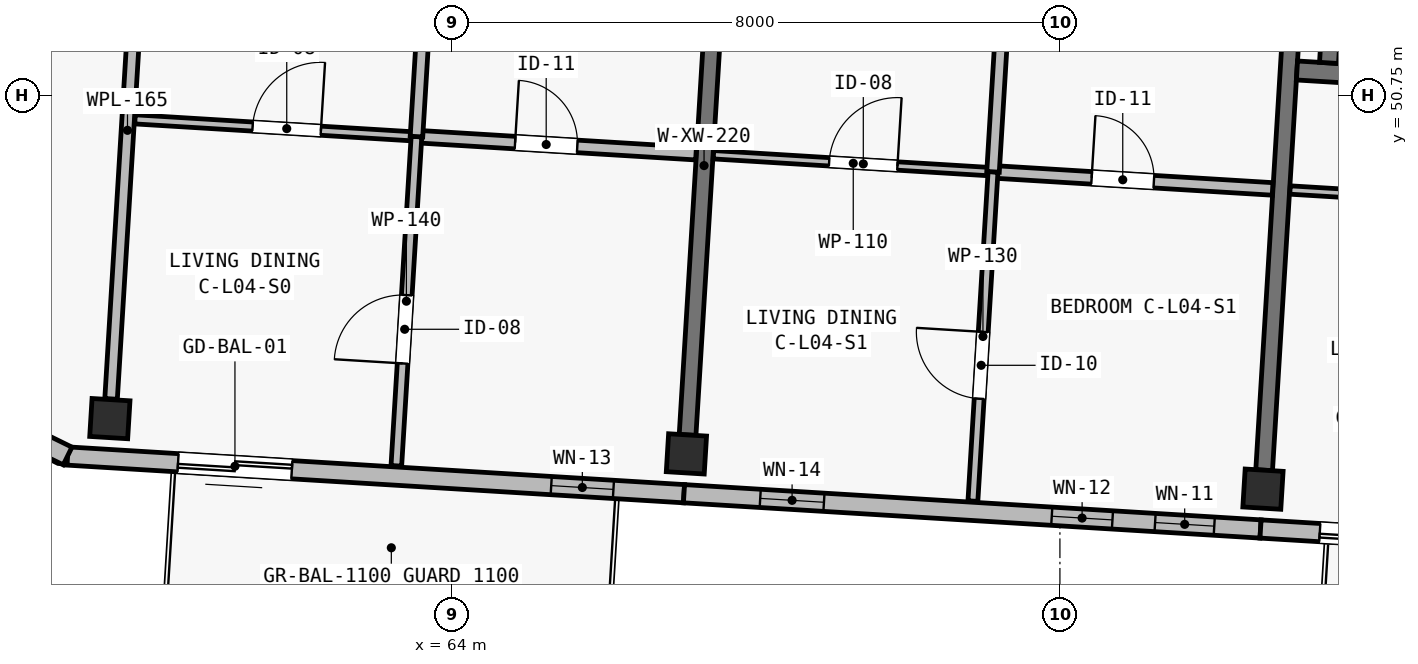
"""IFC4 building model, lengths in metres.
Left out: names, types, materials, properties, quantities, classifications, styles, units other than length and angle.
Written with IfcOpenShell. Run it as: python <this file> out.ifc"""

import sys

from ifc_helpers import new_model, si_unit, direction, frame, frame_2d, origin, origin_2d, place, context, subcontext, project, spatial, rectangle, extrude, element, fill, save


model = new_model("IFC4")
c1 = context("Model", 3, precision=1e-05, world=origin(), true_north=direction((0.0, 1.0)))
c2 = subcontext(c1, "Body", "Model", "MODEL_VIEW")
j1 = project(units=[si_unit("LENGTHUNIT", "METRE"), si_unit("PLANEANGLEUNIT", "RADIAN")], contexts=[c1])
p1 = place(None, origin())
s1 = spatial("IfcSite", under=j1, at=p1, CompositionType="ELEMENT")
p2 = place(p1, origin())
s2 = spatial("IfcBuilding", under=s1, at=p2, CompositionType="ELEMENT")
p3 = place(p2, frame((0.0, 0.0, 14.9)))
s3 = spatial("IfcBuildingStorey", under=s2, at=p3, CompositionType="ELEMENT", Elevation=14.9)
for number, where, z_axis, x_axis in (
    (1, (59.5, 46.5, 0.0), (0.0, 0.0, 1.0), (0.998, -0.061, 0.0)),
    (2, (67.086, 46.036, 0.0), (0.0, 0.0, 1.0), (0.998, -0.061, 0.0)),
    (3, (74.672, 45.572, 0.0), (0.0, 0.0, 1.0), (0.998, -0.061, 0.0)),
):
    element("IfcColumn", number, at=place(p3, frame(where, z_axis=z_axis, x_axis=x_axis)), inside=s3, PredefinedType="COLUMN", context=c2, shape_type="SweptSolid", body=[
        extrude(rectangle(XDim=0.5, YDim=0.5, at=origin_2d()), origin(), (0.0, 0.0, 1.0), 3.25),
    ])
p4 = place(p3, frame((67.101, 46.286, 0.0), z_axis=(0.0, 0.0, 1.0), x_axis=(0.061035953884, 0.998135568114, 0.0)))
e4 = element("IfcWall", 4, at=p4, inside=s3, PredefinedType="SHEAR", context=c2, shape_type="SweptSolid", body=[
    extrude(rectangle(XDim=7.1, YDim=0.22, at=frame_2d((3.55, 0.0))), origin(), (0.0, 0.0, 1.0), 2.5),
])
p5 = place(p3, frame((74.687, 45.822, 0.0), z_axis=(0.0, 0.0, 1.0), x_axis=(0.061033859059, 0.99813569621, 0.0)))
e5 = element("IfcWall", 5, at=p5, inside=s3, PredefinedType="SHEAR", context=c2, shape_type="SweptSolid", body=[
    extrude(rectangle(XDim=7.1, YDim=0.22, at=frame_2d((3.55, 0.0))), origin(), (0.0, 0.0, 1.0), 2.5),
])
p6 = place(p3, frame((75.119, 51.08, 0.0), z_axis=(0.0, 0.0, 1.0), x_axis=(0.998133370443, -0.061071882298, 0.0)))
e6 = element("IfcWall", 6, at=p6, inside=s3, PredefinedType="SHEAR", context=c2, shape_type="SweptSolid", body=[
    extrude(rectangle(XDim=2.99, YDim=0.25, at=frame_2d((1.495, 0.0))), origin(), (0.0, 0.0, 1.0), 3.25),
])
p7 = place(p3, frame((75.541, 51.179, 0.0), z_axis=(0.0, 0.0, 1.0), x_axis=(0.061037062968, 0.998135500293, 0.0)))
e7 = element("IfcWall", 7, at=p7, inside=s3, PredefinedType="SHEAR", context=c2, shape_type="SweptSolid", body=[
    extrude(rectangle(XDim=1.7, YDim=0.25, at=frame_2d((0.85, 0.0))), origin(), (0.0, 0.0, 1.0), 3.25),
])
p8 = place(p3, frame((67.054, 45.512, 0.0), z_axis=(0.0, 0.0, 1.0), x_axis=(-0.998134248939, 0.061057522844, 0.0)))
e8 = element("IfcWall", 8, at=p8, inside=s3, PredefinedType="SOLIDWALL", context=c2, shape_type="SweptSolid", body=[
    extrude(rectangle(XDim=8.125, YDim=0.24, at=frame_2d((4.062, 0.0))), origin(), (0.0, 0.0, 1.0), 3.0),
])
p9 = place(p8, frame((5.169, 0.0, 0.0)))
e9 = element("IfcOpeningElement", 9, at=p9, cuts=e8, PredefinedType="OPENING", context=c2, shape_type="SweptSolid", body=[
    extrude(rectangle(XDim=1.5, YDim=2.12, at=frame_2d((0.75, 1.06))), frame((0.0, 0.135, 0.0), z_axis=(0.0, -1.0, 0.0), x_axis=(1.0, 0.0, 0.0)), (0.0, 0.0, 1.0), 0.27),
])
p10 = place(p8, frame((0.93, 0.0, 0.46)))
e10 = element("IfcOpeningElement", 10, at=p10, cuts=e8, PredefinedType="OPENING", context=c2, shape_type="SweptSolid", body=[
    extrude(rectangle(XDim=0.82, YDim=2.18, at=frame_2d((0.41, 1.09))), frame((0.0, 0.135, 0.0), z_axis=(0.0, -1.0, 0.0), x_axis=(1.0, 0.0, 0.0)), (0.0, 0.0, 1.0), 0.27),
])
p11 = place(p3, frame((74.64, 45.048, 0.0), z_axis=(0.0, 0.0, 1.0), x_axis=(-0.998135669243, 0.061034300063, 0.0)))
e11 = element("IfcWall", 11, at=p11, inside=s3, PredefinedType="SOLIDWALL", context=c2, shape_type="SweptSolid", body=[
    extrude(rectangle(XDim=7.6, YDim=0.24, at=frame_2d((3.8, 0.0))), origin(), (0.0, 0.0, 1.0), 3.0),
])
p12 = place(p11, frame((0.61, 0.0, 0.52)))
e12 = element("IfcOpeningElement", 12, at=p12, cuts=e11, PredefinedType="OPENING", context=c2, shape_type="SweptSolid", body=[
    extrude(rectangle(XDim=0.78, YDim=2.2, at=frame_2d((0.39, 1.1))), frame((0.0, 0.135, 0.0), z_axis=(0.0, -1.0, 0.0), x_axis=(1.0, 0.0, 0.0)), (0.0, 0.0, 1.0), 0.27),
])
p13 = place(p11, frame((1.952, 0.0, 0.42)))
e13 = element("IfcOpeningElement", 13, at=p13, cuts=e11, PredefinedType="OPENING", context=c2, shape_type="SweptSolid", body=[
    extrude(rectangle(XDim=0.8, YDim=2.3, at=frame_2d((0.4, 1.15))), frame((0.0, 0.135, 0.0), z_axis=(0.0, -1.0, 0.0), x_axis=(1.0, 0.0, 0.0)), (0.0, 0.0, 1.0), 0.27),
])
p14 = place(p11, frame((5.755, 0.0, 0.52)))
e14 = element("IfcOpeningElement", 14, at=p14, cuts=e11, PredefinedType="OPENING", context=c2, shape_type="SweptSolid", body=[
    extrude(rectangle(XDim=0.84, YDim=2.28, at=frame_2d((0.42, 1.14))), frame((0.0, 0.135, 0.0), z_axis=(0.0, -1.0, 0.0), x_axis=(1.0, 0.0, 0.0)), (0.0, 0.0, 1.0), 0.27),
])
p15 = place(p3, frame((82.225, 44.584, 0.0), z_axis=(0.0, 0.0, 1.0), x_axis=(-0.998133591969, 0.061068261669, 0.0)))
e15 = element("IfcWall", 15, at=p15, inside=s3, PredefinedType="SOLIDWALL", context=c2, shape_type="SweptSolid", body=[
    extrude(rectangle(XDim=7.6, YDim=0.24, at=frame_2d((3.8, 0.0))), origin(), (0.0, 0.0, 1.0), 3.0),
])
p16 = place(p15, frame((5.019, 0.0, 0.0)))
e16 = element("IfcOpeningElement", 16, at=p16, cuts=e15, PredefinedType="OPENING", context=c2, shape_type="SweptSolid", body=[
    extrude(rectangle(XDim=1.8, YDim=2.12, at=frame_2d((0.9, 1.06))), frame((0.0, 0.135, 0.0), z_axis=(0.0, -1.0, 0.0), x_axis=(1.0, 0.0, 0.0)), (0.0, 0.0, 1.0), 0.27),
])
p17 = place(p15, frame((0.63, 0.0, 0.42)))
e17 = element("IfcOpeningElement", 17, at=p17, cuts=e15, PredefinedType="OPENING", context=c2, shape_type="SweptSolid", body=[
    extrude(rectangle(XDim=0.64, YDim=2.18, at=frame_2d((0.32, 1.09))), frame((0.0, 0.135, 0.0), z_axis=(0.0, -1.0, 0.0), x_axis=(1.0, 0.0, 0.0)), (0.0, 0.0, 1.0), 0.27),
])
p18 = place(p3, frame((58.944, 46.008, 0.0), z_axis=(0.0, 0.0, 1.0), x_axis=(-0.897775054318, 0.440454256246, 0.0)))
e18 = element("IfcWall", 18, at=p18, inside=s3, PredefinedType="SOLIDWALL", context=c2, shape_type="SweptSolid", body=[
    extrude(rectangle(XDim=8.12, YDim=0.26, at=frame_2d((4.06, 0.0))), origin(), (0.0, 0.0, 1.0), 3.0),
])
p19 = place(p18, frame((2.45, 0.0, 0.45)))
e19 = element("IfcOpeningElement", 19, at=p19, cuts=e18, PredefinedType="OPENING", context=c2, shape_type="SweptSolid", body=[
    extrude(rectangle(XDim=0.76, YDim=2.34, at=frame_2d((0.38, 1.17))), frame((0.0, 0.145, 0.0), z_axis=(0.0, -1.0, 0.0), x_axis=(1.0, 0.0, 0.0)), (0.0, 0.0, 1.0), 0.29),
])
p20 = place(p18, frame((5.07, 0.0, 0.52)))
e20 = element("IfcOpeningElement", 20, at=p20, cuts=e18, PredefinedType="OPENING", context=c2, shape_type="SweptSolid", body=[
    extrude(rectangle(XDim=0.6, YDim=2.22, at=frame_2d((0.3, 1.11))), frame((0.0, 0.145, 0.0), z_axis=(0.0, -1.0, 0.0), x_axis=(1.0, 0.0, 0.0)), (0.0, 0.0, 1.0), 0.29),
])
p21 = place(p3, frame((51.654, 49.585, 0.0), z_axis=(0.0, 0.0, 1.0), x_axis=(0.448621989068, 0.893721607059, 0.0)))
e21 = element("IfcWall", 21, at=p21, inside=s3, PredefinedType="SOLIDWALL", context=c2, shape_type="SweptSolid", body=[
    extrude(rectangle(XDim=19.061, YDim=0.26, at=frame_2d((9.53, 0.0))), origin(), (0.0, 0.0, 1.0), 3.0),
])
p22 = place(p21, frame((2.45, 0.0, 0.45)))
e22 = element("IfcOpeningElement", 22, at=p22, cuts=e21, PredefinedType="OPENING", context=c2, shape_type="SweptSolid", body=[
    extrude(rectangle(XDim=0.76, YDim=2.34, at=frame_2d((0.38, 1.17))), frame((0.0, 0.145, 0.0), z_axis=(0.0, -1.0, 0.0), x_axis=(1.0, 0.0, 0.0)), (0.0, 0.0, 1.0), 0.29),
])
p23 = place(p21, frame((16.01, 0.0, 0.52)))
e23 = element("IfcOpeningElement", 23, at=p23, cuts=e21, PredefinedType="OPENING", context=c2, shape_type="SweptSolid", body=[
    extrude(rectangle(XDim=0.6, YDim=2.22, at=frame_2d((0.3, 1.11))), frame((0.0, 0.145, 0.0), z_axis=(0.0, -1.0, 0.0), x_axis=(1.0, 0.0, 0.0)), (0.0, 0.0, 1.0), 0.29),
])
p24 = place(p3, frame((59.516, 46.76, 0.0), z_axis=(0.0, 0.0, 1.0), x_axis=(0.061034344288, 0.998135666539, 0.0)))
e24 = element("IfcWall", 24, at=p24, inside=s3, PredefinedType="PLUMBINGWALL", context=c2, shape_type="SweptSolid", body=[
    extrude(rectangle(XDim=7.08, YDim=0.165, at=frame_2d((3.54, 0.0))), origin(), (0.0, 0.0, 1.0), 2.5),
])
p25 = place(p3, frame((59.831, 50.437, 0.0), z_axis=(0.0, 0.0, 1.0), x_axis=(0.998133408508, -0.061071260176, 0.0)))
e25 = element("IfcWall", 25, at=p25, inside=s3, PredefinedType="PARTITIONING", context=c2, shape_type="SweptSolid", body=[
    extrude(rectangle(XDim=3.71, YDim=0.12, at=frame_2d((1.855, 0.0))), origin(), (0.0, 0.0, 1.0), 2.97),
])
p26 = place(p25, frame((1.55, 0.0, 0.0)))
e26 = element("IfcOpeningElement", 26, at=p26, cuts=e25, PredefinedType="OPENING", context=c2, shape_type="SweptSolid", body=[
    extrude(rectangle(XDim=0.9, YDim=2.1, at=frame_2d((0.45, 1.05))), frame((0.0, 0.075, 0.0), z_axis=(0.0, -1.0, 0.0), x_axis=(1.0, 0.0, 0.0)), (0.0, 0.0, 1.0), 0.15),
])
p27 = place(p3, frame((63.534, 50.211, 0.0), z_axis=(0.0, 0.0, 1.0), x_axis=(0.998132682596, -0.061083123148, 0.0)))
e27 = element("IfcWall", 27, at=p27, inside=s3, PredefinedType="PLUMBINGWALL", context=c2, shape_type="SweptSolid", body=[
    extrude(rectangle(XDim=3.685, YDim=0.165, at=frame_2d((1.843, 0.0))), origin(), (0.0, 0.0, 1.0), 2.97),
])
p28 = place(p27, frame((1.3, 0.0, 0.0)))
e28 = element("IfcOpeningElement", 28, at=p28, cuts=e27, PredefinedType="OPENING", context=c2, shape_type="SweptSolid", body=[
    extrude(rectangle(XDim=0.82, YDim=2.08, at=frame_2d((0.41, 1.04))), frame((0.0, 0.097, 0.0), z_axis=(0.0, -1.0, 0.0), x_axis=(1.0, 0.0, 0.0)), (0.0, 0.0, 1.0), 0.195),
])
p29 = place(p3, frame((63.269, 45.879, 0.0), z_axis=(0.0, 0.0, 1.0), x_axis=(0.06103343432, 0.998135722182, 0.0)))
e29 = element("IfcWall", 29, at=p29, inside=s3, PredefinedType="PARTITIONING", context=c2, shape_type="SweptSolid", body=[
    extrude(rectangle(XDim=4.34, YDim=0.14, at=frame_2d((2.17, 0.0))), origin(), (0.0, 0.0, 1.0), 2.97),
])
p30 = place(p29, frame((1.35, 0.0, 0.0)))
e30 = element("IfcOpeningElement", 30, at=p30, cuts=e29, PredefinedType="OPENING", context=c2, shape_type="SweptSolid", body=[
    extrude(rectangle(XDim=0.9, YDim=2.1, at=frame_2d((0.45, 1.05))), frame((0.0, 0.085, 0.0), z_axis=(0.0, -1.0, 0.0), x_axis=(1.0, 0.0, 0.0)), (0.0, 0.0, 1.0), 0.17),
])
p31 = place(p3, frame((63.534, 50.211, 0.0), z_axis=(0.0, 0.0, 1.0), x_axis=(0.061067374954, 0.99813364622, 0.0)))
e31 = element("IfcWall", 31, at=p31, inside=s3, PredefinedType="PLUMBINGWALL", context=c2, shape_type="SweptSolid", body=[
    extrude(rectangle(XDim=4.07, YDim=0.165, at=frame_2d((2.035, 0.0))), origin(), (0.0, 0.0, 1.0), 2.97),
])
p32 = place(p3, frame((67.442, 49.972, 0.0), z_axis=(0.0, 0.0, 1.0), x_axis=(0.998132682596, -0.061083123148, 0.0)))
e32 = element("IfcWall", 32, at=p32, inside=s3, PredefinedType="PARTITIONING", context=c2, shape_type="SweptSolid", body=[
    extrude(rectangle(XDim=3.685, YDim=0.11, at=frame_2d((1.843, 0.0))), origin(), (0.0, 0.0, 1.0), 2.97),
])
p33 = place(p32, frame((1.525, 0.0, 0.0)))
e33 = element("IfcOpeningElement", 33, at=p33, cuts=e32, PredefinedType="OPENING", context=c2, shape_type="SweptSolid", body=[
    extrude(rectangle(XDim=0.9, YDim=2.1, at=frame_2d((0.45, 1.05))), frame((0.0, 0.07, 0.0), z_axis=(0.0, -1.0, 0.0), x_axis=(1.0, 0.0, 0.0)), (0.0, 0.0, 1.0), 0.14),
])
p34 = place(p3, frame((71.12, 49.747, 0.0), z_axis=(0.0, 0.0, 1.0), x_axis=(0.998136719672, -0.061017119263, 0.0)))
e34 = element("IfcWall", 34, at=p34, inside=s3, PredefinedType="PLUMBINGWALL", context=c2, shape_type="SweptSolid", body=[
    extrude(rectangle(XDim=3.685, YDim=0.165, at=frame_2d((1.843, 0.0))), origin(), (0.0, 0.0, 1.0), 2.97),
])
p35 = place(p34, frame((1.3, 0.0, 0.0)))
e35 = element("IfcOpeningElement", 35, at=p35, cuts=e34, PredefinedType="OPENING", context=c2, shape_type="SweptSolid", body=[
    extrude(rectangle(XDim=0.82, YDim=2.08, at=frame_2d((0.41, 1.04))), frame((0.0, 0.097, 0.0), z_axis=(0.0, -1.0, 0.0), x_axis=(1.0, 0.0, 0.0)), (0.0, 0.0, 1.0), 0.195),
])
p36 = place(p3, frame((70.855, 45.415, 0.0), z_axis=(0.0, 0.0, 1.0), x_axis=(0.061036861365, 0.998135512621, 0.0)))
e36 = element("IfcWall", 36, at=p36, inside=s3, PredefinedType="PARTITIONING", context=c2, shape_type="SweptSolid", body=[
    extrude(rectangle(XDim=4.34, YDim=0.13, at=frame_2d((2.17, 0.0))), origin(), (0.0, 0.0, 1.0), 2.97),
])
p37 = place(p36, frame((1.35, 0.0, 0.0)))
e37 = element("IfcOpeningElement", 37, at=p37, cuts=e36, PredefinedType="OPENING", context=c2, shape_type="SweptSolid", body=[
    extrude(rectangle(XDim=0.88, YDim=2.1, at=frame_2d((0.44, 1.05))), frame((0.0, 0.08, 0.0), z_axis=(0.0, -1.0, 0.0), x_axis=(1.0, 0.0, 0.0)), (0.0, 0.0, 1.0), 0.16),
])
p38 = place(p3, frame((71.12, 49.747, 0.0), z_axis=(0.0, 0.0, 1.0), x_axis=(0.061063718724, 0.998133869907, 0.0)))
e38 = element("IfcWall", 38, at=p38, inside=s3, PredefinedType="PLUMBINGWALL", context=c2, shape_type="SweptSolid", body=[
    extrude(rectangle(XDim=4.07, YDim=0.165, at=frame_2d((2.035, 0.0))), origin(), (0.0, 0.0, 1.0), 2.97),
])
p39 = place(p3, frame((75.028, 49.508, 0.0), z_axis=(0.0, 0.0, 1.0), x_axis=(0.998135637207, -0.061034823981, 0.0)))
e39 = element("IfcWall", 39, at=p39, inside=s3, PredefinedType="PARTITIONING", context=c2, shape_type="SweptSolid", body=[
    extrude(rectangle(XDim=5.08, YDim=0.11, at=frame_2d((2.54, 0.0))), origin(), (0.0, 0.0, 1.0), 2.97),
])
p40 = place(p39, frame((3.595, 0.0, 0.0)))
e40 = element("IfcOpeningElement", 40, at=p40, cuts=e39, PredefinedType="OPENING", context=c2, shape_type="SweptSolid", body=[
    extrude(rectangle(XDim=0.9, YDim=2.1, at=frame_2d((0.45, 1.05))), frame((0.0, 0.07, 0.0), z_axis=(0.0, -1.0, 0.0), x_axis=(1.0, 0.0, 0.0)), (0.0, 0.0, 1.0), 0.14),
])
p41 = place(p9, origin())
e41 = element("IfcDoor", 41, at=p41, inside=s3, OperationType="SLIDING_TO_RIGHT", PredefinedType="DOOR", context=c2, shape_type="SweptSolid", body=[
    extrude(rectangle(XDim=1.5, YDim=2.12, at=frame_2d((0.75, 1.06))), frame((0.0, 0.025, 0.0), z_axis=(0.0, -1.0, 0.0), x_axis=(1.0, 0.0, 0.0)), (0.0, 0.0, 1.0), 0.05),
])
fill(e9, e41)
p42 = place(p10, origin())
e42 = element("IfcWindow", 42, at=p42, inside=s3, PartitioningType="SINGLE_PANEL", PredefinedType="WINDOW", context=c2, shape_type="SweptSolid", body=[
    extrude(rectangle(XDim=0.82, YDim=2.18, at=frame_2d((0.41, 1.09))), frame((0.0, 0.03, 0.0), z_axis=(0.0, -1.0, 0.0), x_axis=(1.0, 0.0, 0.0)), (0.0, 0.0, 1.0), 0.06),
])
fill(e10, e42)
p43 = place(p12, origin())
e43 = element("IfcWindow", 43, at=p43, inside=s3, PartitioningType="SINGLE_PANEL", PredefinedType="WINDOW", context=c2, shape_type="SweptSolid", body=[
    extrude(rectangle(XDim=0.78, YDim=2.2, at=frame_2d((0.39, 1.1))), frame((0.0, 0.03, 0.0), z_axis=(0.0, -1.0, 0.0), x_axis=(1.0, 0.0, 0.0)), (0.0, 0.0, 1.0), 0.06),
])
fill(e12, e43)
p44 = place(p13, origin())
e44 = element("IfcWindow", 44, at=p44, inside=s3, PartitioningType="SINGLE_PANEL", PredefinedType="WINDOW", context=c2, shape_type="SweptSolid", body=[
    extrude(rectangle(XDim=0.8, YDim=2.3, at=frame_2d((0.4, 1.15))), frame((0.0, 0.03, 0.0), z_axis=(0.0, -1.0, 0.0), x_axis=(1.0, 0.0, 0.0)), (0.0, 0.0, 1.0), 0.06),
])
fill(e13, e44)
p45 = place(p14, origin())
e45 = element("IfcWindow", 45, at=p45, inside=s3, PartitioningType="SINGLE_PANEL", PredefinedType="WINDOW", context=c2, shape_type="SweptSolid", body=[
    extrude(rectangle(XDim=0.84, YDim=2.28, at=frame_2d((0.42, 1.14))), frame((0.0, 0.03, 0.0), z_axis=(0.0, -1.0, 0.0), x_axis=(1.0, 0.0, 0.0)), (0.0, 0.0, 1.0), 0.06),
])
fill(e14, e45)
p46 = place(p16, origin())
e46 = element("IfcDoor", 46, at=p46, inside=s3, OperationType="SLIDING_TO_LEFT", PredefinedType="DOOR", context=c2, shape_type="SweptSolid", body=[
    extrude(rectangle(XDim=1.8, YDim=2.12, at=frame_2d((0.9, 1.06))), frame((0.0, 0.025, 0.0), z_axis=(0.0, -1.0, 0.0), x_axis=(1.0, 0.0, 0.0)), (0.0, 0.0, 1.0), 0.05),
])
fill(e16, e46)
p47 = place(p26, origin())
e47 = element("IfcDoor", 47, at=p47, inside=s3, OperationType="SINGLE_SWING_RIGHT", PredefinedType="DOOR", context=c2, shape_type="SweptSolid", body=[
    extrude(rectangle(XDim=0.9, YDim=2.1, at=frame_2d((0.45, 1.05))), frame((0.0, 0.025, 0.0), z_axis=(0.0, -1.0, 0.0), x_axis=(1.0, 0.0, 0.0)), (0.0, 0.0, 1.0), 0.05),
])
fill(e26, e47)
p48 = place(p28, origin())
e48 = element("IfcDoor", 48, at=p48, inside=s3, OperationType="SINGLE_SWING_LEFT", PredefinedType="DOOR", context=c2, shape_type="SweptSolid", body=[
    extrude(rectangle(XDim=0.82, YDim=2.08, at=frame_2d((0.41, 1.04))), frame((0.0, 0.025, 0.0), z_axis=(0.0, -1.0, 0.0), x_axis=(1.0, 0.0, 0.0)), (0.0, 0.0, 1.0), 0.05),
])
fill(e28, e48)
p49 = place(p30, origin())
e49 = element("IfcDoor", 49, at=p49, inside=s3, OperationType="SINGLE_SWING_LEFT", PredefinedType="DOOR", context=c2, shape_type="SweptSolid", body=[
    extrude(rectangle(XDim=0.9, YDim=2.1, at=frame_2d((0.45, 1.05))), frame((0.0, 0.025, 0.0), z_axis=(0.0, -1.0, 0.0), x_axis=(1.0, 0.0, 0.0)), (0.0, 0.0, 1.0), 0.05),
])
fill(e30, e49)
p50 = place(p33, origin())
e50 = element("IfcDoor", 50, at=p50, inside=s3, OperationType="SINGLE_SWING_RIGHT", PredefinedType="DOOR", context=c2, shape_type="SweptSolid", body=[
    extrude(rectangle(XDim=0.9, YDim=2.1, at=frame_2d((0.45, 1.05))), frame((0.0, 0.025, 0.0), z_axis=(0.0, -1.0, 0.0), x_axis=(1.0, 0.0, 0.0)), (0.0, 0.0, 1.0), 0.05),
])
fill(e33, e50)
p51 = place(p35, origin())
e51 = element("IfcDoor", 51, at=p51, inside=s3, OperationType="SINGLE_SWING_LEFT", PredefinedType="DOOR", context=c2, shape_type="SweptSolid", body=[
    extrude(rectangle(XDim=0.82, YDim=2.08, at=frame_2d((0.41, 1.04))), frame((0.0, 0.025, 0.0), z_axis=(0.0, -1.0, 0.0), x_axis=(1.0, 0.0, 0.0)), (0.0, 0.0, 1.0), 0.05),
])
fill(e35, e51)
p52 = place(p37, origin())
e52 = element("IfcDoor", 52, at=p52, inside=s3, OperationType="SINGLE_SWING_RIGHT", PredefinedType="DOOR", context=c2, shape_type="SweptSolid", body=[
    extrude(rectangle(XDim=0.88, YDim=2.1, at=frame_2d((0.44, 1.05))), frame((0.0, 0.025, 0.0), z_axis=(0.0, -1.0, 0.0), x_axis=(1.0, 0.0, 0.0)), (0.0, 0.0, 1.0), 0.05),
])
fill(e37, e52)
save(model, sys.argv[1])
